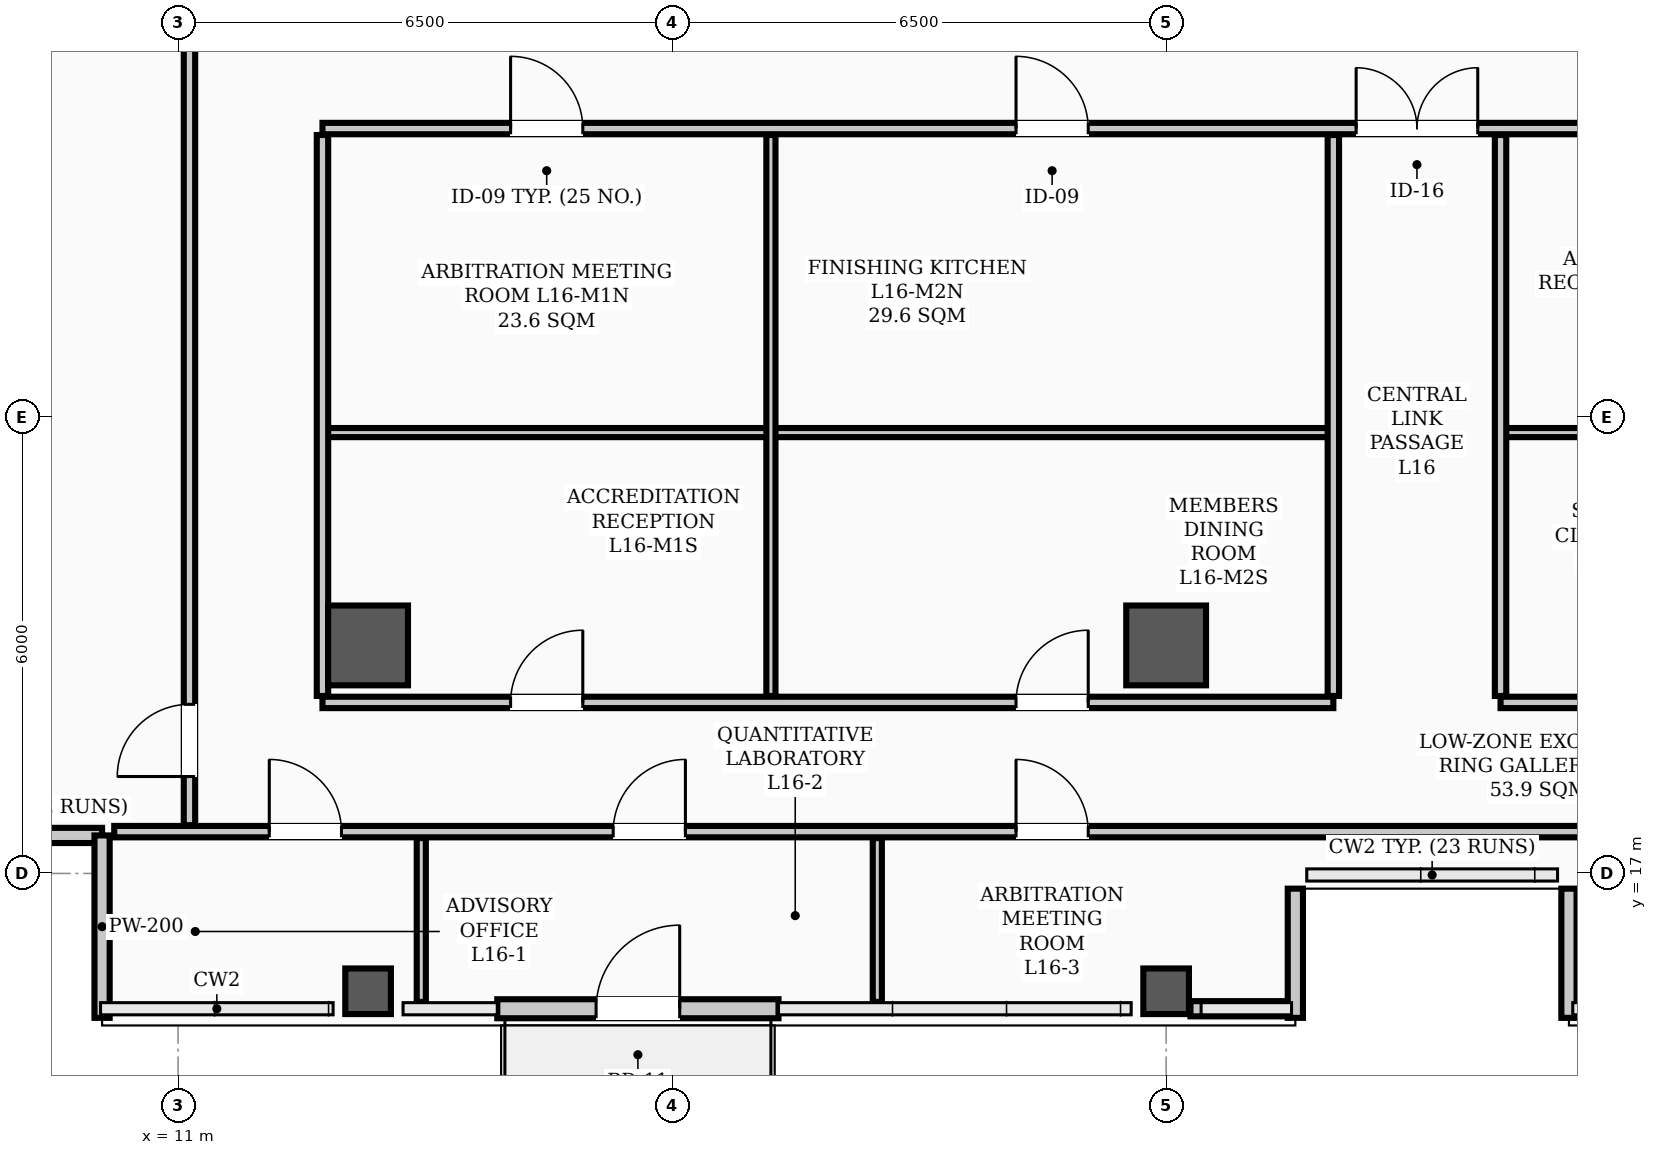
"""IFC4 building model, lengths in metres.
Left out: names, types, materials, properties, quantities, classifications, styles, units other than length and angle.
Written with IfcOpenShell. Run it as: python <this file> out.ifc"""

import sys

from ifc_helpers import new_model, si_unit, direction, frame, frame_2d, origin, origin_2d, place, context, subcontext, project, spatial, rectangle, hollow_rectangle, extrude, element, fill, save


model = new_model("IFC4")
c1 = context("Model", 3, precision=1e-05, world=origin(), true_north=direction((0.0, 1.0)))
c2 = subcontext(c1, "Body", "Model", "MODEL_VIEW")
j1 = project(units=[si_unit("LENGTHUNIT", "METRE"), si_unit("PLANEANGLEUNIT", "RADIAN")], contexts=[c1])
p1 = place(None, origin())
s1 = spatial("IfcSite", under=j1, at=p1, CompositionType="ELEMENT")
p2 = place(p1, origin())
s2 = spatial("IfcBuilding", under=s1, at=p2, CompositionType="ELEMENT")
p3 = place(p2, frame((0.0, 0.0, 65.5)))
s3 = spatial("IfcBuildingStorey", under=s2, at=p3, CompositionType="ELEMENT", Elevation=65.5)
for number, where, z_axis, x_axis in (
    (1, (13.5, 20.0, 0.0), (0.0, 0.0, 1.0), (1.0, 0.0, 0.0)),
    (2, (24.0, 20.0, 0.0), (0.0, 0.0, 1.0), (1.0, 0.0, 0.0)),
):
    element("IfcColumn", number, at=place(p3, frame(where, z_axis=z_axis, x_axis=x_axis)), inside=s3, PredefinedType="COLUMN", context=c2, shape_type="SweptSolid", body=[
        extrude(hollow_rectangle(XDim=1.05, YDim=1.05, WallThickness=0.038, InnerFilletRadius=0.019, OuterFilletRadius=0.057, at=origin_2d()), origin(), (0.0, 0.0, 1.0), 3.9),
    ])
for number, where, z_axis, x_axis in (
    (3, (13.5, 15.45, 0.0), (0.0, 0.0, 1.0), (1.0, 0.0, 0.0)),
    (4, (24.0, 15.45, 0.0), (0.0, 0.0, 1.0), (1.0, 0.0, 0.0)),
):
    element("IfcColumn", number, at=place(p3, frame(where, z_axis=z_axis, x_axis=x_axis)), inside=s3, PredefinedType="COLUMN", context=c2, shape_type="SweptSolid", body=[
        extrude(hollow_rectangle(XDim=0.6, YDim=0.6, WallThickness=0.026, InnerFilletRadius=0.013, OuterFilletRadius=0.039, at=origin_2d()), origin(), (0.0, 0.0, 1.0), 3.9),
    ])
for number, where, z_axis, x_axis in (
    (5, (24.32, 15.22, 0.0), (0.0, 0.0, 1.0), (1.0, 0.0, 0.0)),
    (6, (29.35, 15.22, 0.0), (0.0, 0.0, 1.0), (1.0, 0.0, 0.0)),
):
    element("IfcWall", number, at=place(p3, frame(where, z_axis=z_axis, x_axis=x_axis)), inside=s3, PredefinedType="PARAPET", context=c2, shape_type="SweptSolid", body=[
        extrude(rectangle(XDim=1.33, YDim=0.2, at=frame_2d((0.665, 0.0))), origin(), (0.0, 0.0, 1.0), 1.2),
    ])
for number, where, z_axis, x_axis in (
    (7, (7.6, 17.5, 0.0), (0.0, 0.0, 1.0), (1.0, 0.0, 0.0)),
    (8, (10.0, 17.5, 0.0), (0.0, 0.0, 1.0), (0.0, -1.0, 0.0)),
):
    element("IfcWall", number, at=place(p3, frame(where, z_axis=z_axis, x_axis=x_axis)), inside=s3, PredefinedType="PARAPET", context=c2, shape_type="SweptSolid", body=[
        extrude(rectangle(XDim=2.4, YDim=0.2, at=frame_2d((1.2, 0.0))), origin(), (0.0, 0.0, 1.0), 1.2),
    ])
for number, where, z_axis, x_axis in (
    (9, (25.7, 15.1, 0.0), (0.0, 0.0, 1.0), (0.0, 1.0, 0.0)),
    (10, (29.3, 16.8, 0.0), (0.0, 0.0, 1.0), (0.0, -1.0, 0.0)),
):
    element("IfcWall", number, at=place(p3, frame(where, z_axis=z_axis, x_axis=x_axis)), inside=s3, PredefinedType="PARAPET", context=c2, shape_type="SweptSolid", body=[
        extrude(rectangle(XDim=1.7, YDim=0.2, at=frame_2d((0.85, 0.0))), origin(), (0.0, 0.0, 1.0), 1.2),
    ])
p4 = place(p3, frame((15.2, 15.22, 0.0), z_axis=(0.0, 0.0, 1.0), x_axis=(1.0, 0.0, 0.0)))
e11 = element("IfcWall", 11, at=p4, inside=s3, PredefinedType="STANDARD", context=c2, shape_type="SweptSolid", body=[
    extrude(rectangle(XDim=3.7, YDim=0.25, at=frame_2d((1.85, 0.0))), origin(), (0.0, 0.0, 1.0), 3.18),
])
p5 = place(p4, frame((1.3, 0.0, 0.0)))
e12 = element("IfcOpeningElement", 12, at=p5, cuts=e11, PredefinedType="OPENING", context=c2, shape_type="SweptSolid", body=[
    extrude(rectangle(XDim=1.1, YDim=2.2, at=frame_2d((0.55, 1.1))), frame((0.0, 0.135, 0.0), z_axis=(0.0, -1.0, 0.0), x_axis=(1.0, 0.0, 0.0)), (0.0, 0.0, 1.0), 0.27),
])
p6 = place(p3, frame((12.9, 26.8, 0.0), z_axis=(0.0, 0.0, 1.0), x_axis=(1.0, 0.0, 0.0)))
e13 = element("IfcWall", 13, at=p6, inside=s3, PredefinedType="PARTITIONING", context=c2, shape_type="SweptSolid", body=[
    extrude(rectangle(XDim=31.7, YDim=0.15, at=frame_2d((15.85, 0.0))), origin(), (0.0, 0.0, 1.0), 3.1),
])
p7 = place(p6, frame((13.6, 0.0, 0.0)))
e14 = element("IfcOpeningElement", 14, at=p7, cuts=e13, PredefinedType="OPENING", context=c2, shape_type="SweptSolid", body=[
    extrude(rectangle(XDim=1.6, YDim=2.08, at=frame_2d((0.8, 1.04))), frame((0.0, 0.085, 0.0), z_axis=(0.0, -1.0, 0.0), x_axis=(1.0, 0.0, 0.0)), (0.0, 0.0, 1.0), 0.17),
])
p8 = place(p6, frame((2.475, 0.0, 0.0)))
e15 = element("IfcOpeningElement", 15, at=p8, cuts=e13, PredefinedType="OPENING", context=c2, shape_type="SweptSolid", body=[
    extrude(rectangle(XDim=0.95, YDim=2.08, at=frame_2d((0.475, 1.04))), frame((0.0, 0.085, 0.0), z_axis=(0.0, -1.0, 0.0), x_axis=(1.0, 0.0, 0.0)), (0.0, 0.0, 1.0), 0.17),
])
p9 = place(p6, frame((9.125, 0.0, 0.0)))
e16 = element("IfcOpeningElement", 16, at=p9, cuts=e13, PredefinedType="OPENING", context=c2, shape_type="SweptSolid", body=[
    extrude(rectangle(XDim=0.95, YDim=2.08, at=frame_2d((0.475, 1.04))), frame((0.0, 0.085, 0.0), z_axis=(0.0, -1.0, 0.0), x_axis=(1.0, 0.0, 0.0)), (0.0, 0.0, 1.0), 0.17),
])
p10 = place(p6, frame((19.125, 0.0, 0.0)))
e17 = element("IfcOpeningElement", 17, at=p10, cuts=e13, PredefinedType="OPENING", context=c2, shape_type="SweptSolid", body=[
    extrude(rectangle(XDim=0.95, YDim=2.08, at=frame_2d((0.475, 1.04))), frame((0.0, 0.085, 0.0), z_axis=(0.0, -1.0, 0.0), x_axis=(1.0, 0.0, 0.0)), (0.0, 0.0, 1.0), 0.17),
])
p11 = place(p6, frame((26.325, 0.0, 0.0)))
e18 = element("IfcOpeningElement", 18, at=p11, cuts=e13, PredefinedType="OPENING", context=c2, shape_type="SweptSolid", body=[
    extrude(rectangle(XDim=0.95, YDim=2.08, at=frame_2d((0.475, 1.04))), frame((0.0, 0.085, 0.0), z_axis=(0.0, -1.0, 0.0), x_axis=(1.0, 0.0, 0.0)), (0.0, 0.0, 1.0), 0.17),
])
p12 = place(p3, frame((10.16, 17.55, 0.0), z_axis=(0.0, 0.0, 1.0), x_axis=(1.0, 0.0, 0.0)))
e19 = element("IfcWall", 19, at=p12, inside=s3, PredefinedType="PARTITIONING", context=c2, shape_type="SweptSolid", body=[
    extrude(rectangle(XDim=44.68, YDim=0.15, at=frame_2d((22.34, 0.0))), origin(), (0.0, 0.0, 1.0), 3.1),
])
p13 = place(p12, frame((2.04, 0.0, 0.0)))
e20 = element("IfcOpeningElement", 20, at=p13, cuts=e19, PredefinedType="OPENING", context=c2, shape_type="SweptSolid", body=[
    extrude(rectangle(XDim=0.95, YDim=2.08, at=frame_2d((0.475, 1.04))), frame((0.0, 0.085, 0.0), z_axis=(0.0, -1.0, 0.0), x_axis=(1.0, 0.0, 0.0)), (0.0, 0.0, 1.0), 0.17),
])
p14 = place(p12, frame((6.565, 0.0, 0.0)))
e21 = element("IfcOpeningElement", 21, at=p14, cuts=e19, PredefinedType="OPENING", context=c2, shape_type="SweptSolid", body=[
    extrude(rectangle(XDim=0.95, YDim=2.08, at=frame_2d((0.475, 1.04))), frame((0.0, 0.085, 0.0), z_axis=(0.0, -1.0, 0.0), x_axis=(1.0, 0.0, 0.0)), (0.0, 0.0, 1.0), 0.17),
])
p15 = place(p12, frame((11.865, 0.0, 0.0)))
e22 = element("IfcOpeningElement", 22, at=p15, cuts=e19, PredefinedType="OPENING", context=c2, shape_type="SweptSolid", body=[
    extrude(rectangle(XDim=0.95, YDim=2.08, at=frame_2d((0.475, 1.04))), frame((0.0, 0.085, 0.0), z_axis=(0.0, -1.0, 0.0), x_axis=(1.0, 0.0, 0.0)), (0.0, 0.0, 1.0), 0.17),
])
p16 = place(p12, frame((24.665, 0.0, 0.0)))
e23 = element("IfcOpeningElement", 23, at=p16, cuts=e19, PredefinedType="OPENING", context=c2, shape_type="SweptSolid", body=[
    extrude(rectangle(XDim=0.95, YDim=2.08, at=frame_2d((0.475, 1.04))), frame((0.0, 0.085, 0.0), z_axis=(0.0, -1.0, 0.0), x_axis=(1.0, 0.0, 0.0)), (0.0, 0.0, 1.0), 0.17),
])
p17 = place(p12, frame((31.765, 0.0, 0.0)))
e24 = element("IfcOpeningElement", 24, at=p17, cuts=e19, PredefinedType="OPENING", context=c2, shape_type="SweptSolid", body=[
    extrude(rectangle(XDim=0.95, YDim=2.08, at=frame_2d((0.475, 1.04))), frame((0.0, 0.085, 0.0), z_axis=(0.0, -1.0, 0.0), x_axis=(1.0, 0.0, 0.0)), (0.0, 0.0, 1.0), 0.17),
])
p18 = place(p3, frame((12.9, 19.25, 0.0), z_axis=(0.0, 0.0, 1.0), x_axis=(1.0, 0.0, 0.0)))
e25 = element("IfcWall", 25, at=p18, inside=s3, PredefinedType="PARTITIONING", context=c2, shape_type="SweptSolid", body=[
    extrude(rectangle(XDim=13.3, YDim=0.15, at=frame_2d((6.65, 0.0))), origin(), (0.0, 0.0, 1.0), 3.1),
])
p19 = place(p18, frame((2.475, 0.0, 0.0)))
e26 = element("IfcOpeningElement", 26, at=p19, cuts=e25, PredefinedType="OPENING", context=c2, shape_type="SweptSolid", body=[
    extrude(rectangle(XDim=0.95, YDim=2.08, at=frame_2d((0.475, 1.04))), frame((0.0, 0.085, 0.0), z_axis=(0.0, -1.0, 0.0), x_axis=(1.0, 0.0, 0.0)), (0.0, 0.0, 1.0), 0.17),
])
p20 = place(p18, frame((9.125, 0.0, 0.0)))
e27 = element("IfcOpeningElement", 27, at=p20, cuts=e25, PredefinedType="OPENING", context=c2, shape_type="SweptSolid", body=[
    extrude(rectangle(XDim=0.95, YDim=2.08, at=frame_2d((0.475, 1.04))), frame((0.0, 0.085, 0.0), z_axis=(0.0, -1.0, 0.0), x_axis=(1.0, 0.0, 0.0)), (0.0, 0.0, 1.0), 0.17),
])
p21 = place(p3, frame((28.4, 19.25, 0.0), z_axis=(0.0, 0.0, 1.0), x_axis=(1.0, 0.0, 0.0)))
e28 = element("IfcWall", 28, at=p21, inside=s3, PredefinedType="PARTITIONING", context=c2, shape_type="SweptSolid", body=[
    extrude(rectangle(XDim=16.2, YDim=0.15, at=frame_2d((8.1, 0.0))), origin(), (0.0, 0.0, 1.0), 3.1),
])
p22 = place(p21, frame((3.625, 0.0, 0.0)))
e29 = element("IfcOpeningElement", 29, at=p22, cuts=e28, PredefinedType="OPENING", context=c2, shape_type="SweptSolid", body=[
    extrude(rectangle(XDim=0.95, YDim=2.08, at=frame_2d((0.475, 1.04))), frame((0.0, 0.085, 0.0), z_axis=(0.0, -1.0, 0.0), x_axis=(1.0, 0.0, 0.0)), (0.0, 0.0, 1.0), 0.17),
])
p23 = place(p21, frame((10.825, 0.0, 0.0)))
e30 = element("IfcOpeningElement", 30, at=p23, cuts=e28, PredefinedType="OPENING", context=c2, shape_type="SweptSolid", body=[
    extrude(rectangle(XDim=0.95, YDim=2.08, at=frame_2d((0.475, 1.04))), frame((0.0, 0.085, 0.0), z_axis=(0.0, -1.0, 0.0), x_axis=(1.0, 0.0, 0.0)), (0.0, 0.0, 1.0), 0.17),
])
p24 = place(p3, frame((12.9, 22.8, 0.0), z_axis=(0.0, 0.0, 1.0), x_axis=(1.0, 0.0, 0.0)))
e31 = element("IfcWall", 31, at=p24, inside=s3, PredefinedType="PARTITIONING", context=c2, shape_type="SweptSolid", body=[
    extrude(rectangle(XDim=5.9, YDim=0.12, at=frame_2d((2.95, 0.0))), origin(), (0.0, 0.0, 1.0), 3.1),
])
p25 = place(p3, frame((18.8, 22.8, 0.0), z_axis=(0.0, 0.0, 1.0), x_axis=(1.0, 0.0, 0.0)))
e32 = element("IfcWall", 32, at=p25, inside=s3, PredefinedType="PARTITIONING", context=c2, shape_type="SweptSolid", body=[
    extrude(rectangle(XDim=7.4, YDim=0.12, at=frame_2d((3.7, 0.0))), origin(), (0.0, 0.0, 1.0), 3.1),
])
p26 = place(p3, frame((28.4, 22.8, 0.0), z_axis=(0.0, 0.0, 1.0), x_axis=(1.0, 0.0, 0.0)))
e33 = element("IfcWall", 33, at=p26, inside=s3, PredefinedType="PARTITIONING", context=c2, shape_type="SweptSolid", body=[
    extrude(rectangle(XDim=6.4, YDim=0.12, at=frame_2d((3.2, 0.0))), origin(), (0.0, 0.0, 1.0), 3.1),
])
for number, where, z_axis, x_axis in (
    (34, (26.2, 19.335, 0.0), (0.0, 0.0, 1.0), (0.0, 1.0, 0.0)),
    (35, (28.4, 19.335, 0.0), (0.0, 0.0, 1.0), (0.0, 1.0, 0.0)),
):
    element("IfcWall", number, at=place(p3, frame(where, z_axis=z_axis, x_axis=x_axis)), inside=s3, PredefinedType="PARTITIONING", context=c2, shape_type="SweptSolid", body=[
        extrude(rectangle(XDim=7.38, YDim=0.15, at=frame_2d((3.69, 0.0))), origin(), (0.0, 0.0, 1.0), 3.0),
    ])
p27 = place(p3, frame((11.15, 17.635, 0.0), z_axis=(0.0, 0.0, 1.0), x_axis=(0.0, 1.0, 0.0)))
e36 = element("IfcWall", 36, at=p27, inside=s3, PredefinedType="PARTITIONING", context=c2, shape_type="SweptSolid", body=[
    extrude(rectangle(XDim=22.53, YDim=0.15, at=frame_2d((11.265, 0.0))), origin(), (0.0, 0.0, 1.0), 3.0),
])
p28 = place(p27, frame((0.64, 0.0, 0.0)))
e37 = element("IfcOpeningElement", 37, at=p28, cuts=e36, PredefinedType="OPENING", context=c2, shape_type="SweptSolid", body=[
    extrude(rectangle(XDim=0.95, YDim=2.08, at=frame_2d((0.475, 1.04))), frame((0.0, 0.085, 0.0), z_axis=(0.0, -1.0, 0.0), x_axis=(1.0, 0.0, 0.0)), (0.0, 0.0, 1.0), 0.17),
])
p29 = place(p3, frame((12.9, 19.335, 0.0), z_axis=(0.0, 0.0, 1.0), x_axis=(0.0, 1.0, 0.0)))
e38 = element("IfcWall", 38, at=p29, inside=s3, PredefinedType="PARTITIONING", context=c2, shape_type="SweptSolid", body=[
    extrude(rectangle(XDim=7.38, YDim=0.15, at=frame_2d((3.69, 0.0))), origin(), (0.0, 0.0, 1.0), 3.0),
])
for number, where, z_axis, x_axis in (
    (39, (14.2, 15.31, 0.0), (0.0, 0.0, 1.0), (0.0, 1.0, 0.0)),
    (40, (20.2, 15.31, 0.0), (0.0, 0.0, 1.0), (0.0, 1.0, 0.0)),
):
    element("IfcWall", number, at=place(p3, frame(where, z_axis=z_axis, x_axis=x_axis)), inside=s3, PredefinedType="PARTITIONING", context=c2, shape_type="SweptSolid", body=[
        extrude(rectangle(XDim=2.155, YDim=0.12, at=frame_2d((1.078, 0.0))), origin(), (0.0, 0.0, 1.0), 3.212),
    ])
p30 = place(p3, frame((18.8, 19.335, 0.0), z_axis=(0.0, 0.0, 1.0), x_axis=(0.0, 1.0, 0.0)))
e41 = element("IfcWall", 41, at=p30, inside=s3, PredefinedType="PARTITIONING", context=c2, shape_type="SweptSolid", body=[
    extrude(rectangle(XDim=7.38, YDim=0.12, at=frame_2d((3.69, 0.0))), origin(), (0.0, 0.0, 1.0), 3.0),
])
p31 = place(p5, origin())
e42 = element("IfcDoor", 42, at=p31, inside=s3, OperationType="SINGLE_SWING_RIGHT", PredefinedType="DOOR", context=c2, shape_type="SweptSolid", body=[
    extrude(rectangle(XDim=1.1, YDim=2.2, at=frame_2d((0.55, 1.1))), frame((0.0, 0.025, 0.0), z_axis=(0.0, -1.0, 0.0), x_axis=(1.0, 0.0, 0.0)), (0.0, 0.0, 1.0), 0.05),
])
fill(e12, e42)
p32 = place(p7, origin())
e43 = element("IfcDoor", 43, at=p32, inside=s3, OperationType="DOUBLE_DOOR_SINGLE_SWING", PredefinedType="DOOR", context=c2, shape_type="SweptSolid", body=[
    extrude(rectangle(XDim=1.6, YDim=2.08, at=frame_2d((0.8, 1.04))), frame((0.0, 0.025, 0.0), z_axis=(0.0, -1.0, 0.0), x_axis=(1.0, 0.0, 0.0)), (0.0, 0.0, 1.0), 0.05),
])
fill(e14, e43)
p33 = place(p13, origin())
e44 = element("IfcDoor", 44, at=p33, inside=s3, OperationType="SINGLE_SWING_LEFT", PredefinedType="DOOR", context=c2, shape_type="SweptSolid", body=[
    extrude(rectangle(XDim=0.95, YDim=2.08, at=frame_2d((0.475, 1.04))), frame((0.0, 0.025, 0.0), z_axis=(0.0, -1.0, 0.0), x_axis=(1.0, 0.0, 0.0)), (0.0, 0.0, 1.0), 0.05),
])
fill(e20, e44)
p34 = place(p14, origin())
e45 = element("IfcDoor", 45, at=p34, inside=s3, OperationType="SINGLE_SWING_RIGHT", PredefinedType="DOOR", context=c2, shape_type="SweptSolid", body=[
    extrude(rectangle(XDim=0.95, YDim=2.08, at=frame_2d((0.475, 1.04))), frame((0.0, 0.025, 0.0), z_axis=(0.0, -1.0, 0.0), x_axis=(1.0, 0.0, 0.0)), (0.0, 0.0, 1.0), 0.05),
])
fill(e21, e45)
p35 = place(p15, origin())
e46 = element("IfcDoor", 46, at=p35, inside=s3, OperationType="SINGLE_SWING_LEFT", PredefinedType="DOOR", context=c2, shape_type="SweptSolid", body=[
    extrude(rectangle(XDim=0.95, YDim=2.08, at=frame_2d((0.475, 1.04))), frame((0.0, 0.025, 0.0), z_axis=(0.0, -1.0, 0.0), x_axis=(1.0, 0.0, 0.0)), (0.0, 0.0, 1.0), 0.05),
])
fill(e22, e46)
p36 = place(p8, origin())
e47 = element("IfcDoor", 47, at=p36, inside=s3, OperationType="SINGLE_SWING_LEFT", PredefinedType="DOOR", context=c2, shape_type="SweptSolid", body=[
    extrude(rectangle(XDim=0.95, YDim=2.08, at=frame_2d((0.475, 1.04))), frame((0.0, 0.025, 0.0), z_axis=(0.0, -1.0, 0.0), x_axis=(1.0, 0.0, 0.0)), (0.0, 0.0, 1.0), 0.05),
])
fill(e15, e47)
p37 = place(p19, origin())
e48 = element("IfcDoor", 48, at=p37, inside=s3, OperationType="SINGLE_SWING_RIGHT", PredefinedType="DOOR", context=c2, shape_type="SweptSolid", body=[
    extrude(rectangle(XDim=0.95, YDim=2.08, at=frame_2d((0.475, 1.04))), frame((0.0, 0.025, 0.0), z_axis=(0.0, -1.0, 0.0), x_axis=(1.0, 0.0, 0.0)), (0.0, 0.0, 1.0), 0.05),
])
fill(e26, e48)
p38 = place(p9, origin())
e49 = element("IfcDoor", 49, at=p38, inside=s3, OperationType="SINGLE_SWING_LEFT", PredefinedType="DOOR", context=c2, shape_type="SweptSolid", body=[
    extrude(rectangle(XDim=0.95, YDim=2.08, at=frame_2d((0.475, 1.04))), frame((0.0, 0.025, 0.0), z_axis=(0.0, -1.0, 0.0), x_axis=(1.0, 0.0, 0.0)), (0.0, 0.0, 1.0), 0.05),
])
fill(e16, e49)
p39 = place(p20, origin())
e50 = element("IfcDoor", 50, at=p39, inside=s3, OperationType="SINGLE_SWING_RIGHT", PredefinedType="DOOR", context=c2, shape_type="SweptSolid", body=[
    extrude(rectangle(XDim=0.95, YDim=2.08, at=frame_2d((0.475, 1.04))), frame((0.0, 0.025, 0.0), z_axis=(0.0, -1.0, 0.0), x_axis=(1.0, 0.0, 0.0)), (0.0, 0.0, 1.0), 0.05),
])
fill(e27, e50)
p40 = place(p28, origin())
e51 = element("IfcDoor", 51, at=p40, inside=s3, OperationType="SINGLE_SWING_LEFT", PredefinedType="DOOR", context=c2, shape_type="SweptSolid", body=[
    extrude(rectangle(XDim=0.95, YDim=2.08, at=frame_2d((0.475, 1.04))), frame((0.0, 0.025, 0.0), z_axis=(0.0, -1.0, 0.0), x_axis=(1.0, 0.0, 0.0)), (0.0, 0.0, 1.0), 0.05),
])
fill(e37, e51)
save(model, sys.argv[1])
